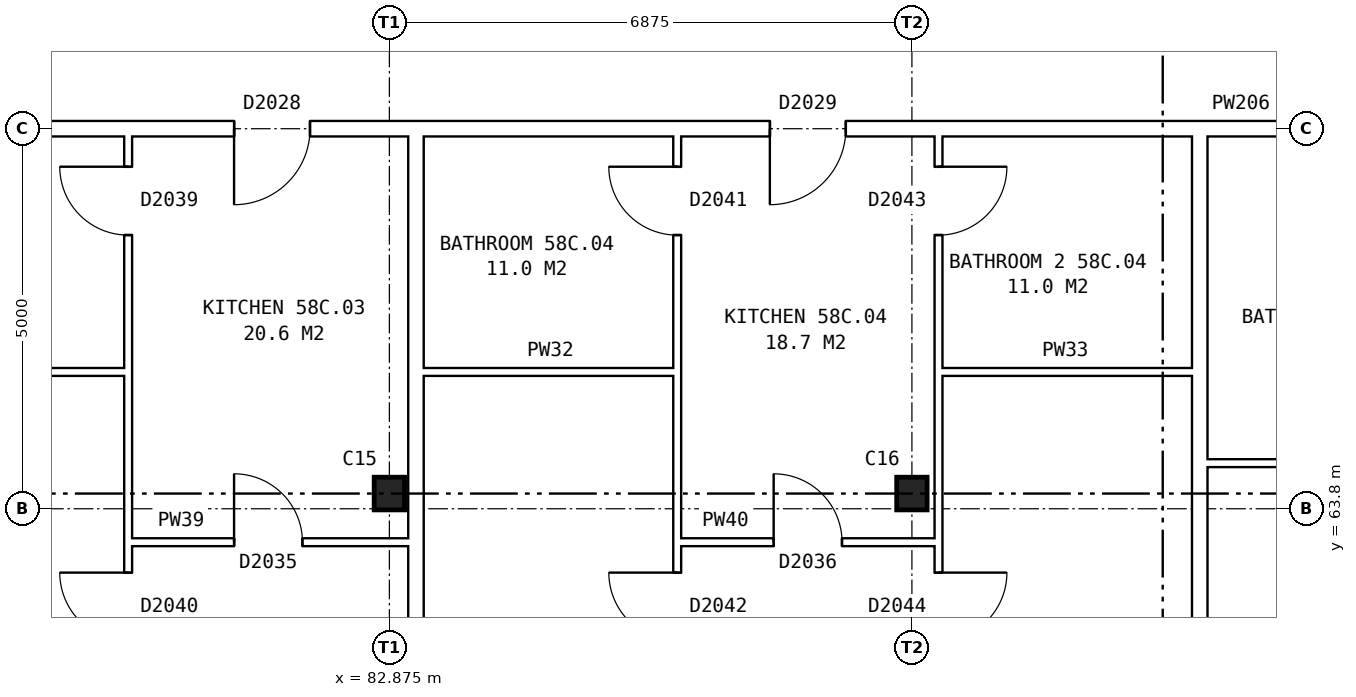
"""IFC4 building model, lengths in metres.
Left out: names, types, materials, properties, quantities, classifications, styles, units other than length and angle.
Written with IfcOpenShell. Run it as: python <this file> out.ifc"""

import sys

from ifc_helpers import new_model, si_unit, direction, frame, frame_2d, origin, origin_2d, place, context, subcontext, project, spatial, rectangle, i_section, extrude, element, fill, save


model = new_model("IFC4")
c1 = context("Model", 3, precision=1e-05, world=origin(), true_north=direction((0.0, 1.0)))
c2 = subcontext(c1, "Body", "Model", "MODEL_VIEW")
j1 = project(units=[si_unit("LENGTHUNIT", "METRE"), si_unit("PLANEANGLEUNIT", "RADIAN")], contexts=[c1])
p1 = place(None, origin())
s1 = spatial("IfcSite", under=j1, at=p1, CompositionType="ELEMENT")
p2 = place(p1, origin())
s2 = spatial("IfcBuilding", under=s1, at=p2, CompositionType="ELEMENT")
p3 = place(p2, frame((0.0, 0.0, 205.9)))
s3 = spatial("IfcBuildingStorey", under=s2, at=p3, CompositionType="ELEMENT", Elevation=205.9)
for number, where, z_axis, x_axis in (
    (1, (82.875, 64.0, 0.0), (0.0, 0.0, 1.0), (1.0, 0.0, 0.0)),
    (2, (89.75, 64.0, 0.0), (0.0, 0.0, 1.0), (1.0, 0.0, 0.0)),
):
    element("IfcColumn", number, at=place(p3, frame(where, z_axis=z_axis, x_axis=x_axis)), inside=s3, PredefinedType="COLUMN", context=c2, shape_type="SweptSolid", body=[
        extrude(i_section(OverallWidth=0.4, OverallDepth=0.43, WebThickness=0.04, FlangeThickness=0.04, at=origin_2d()), origin(), (0.0, 0.0, 1.0), 2.85),
    ])
p4 = place(p3, frame((79.438, 63.36, 0.0), z_axis=(0.0, 0.0, 1.0), x_axis=(1.0, 0.0, 0.0)))
e3 = element("IfcWall", 3, at=p4, inside=s3, PredefinedType="PARTITIONING", context=c2, shape_type="SweptSolid", body=[
    extrude(rectangle(XDim=3.687, YDim=0.1, at=frame_2d((1.844, 0.0))), origin(), (0.0, 0.0, 1.0), 2.85),
])
p5 = place(p4, frame((1.394, 0.0, 0.0)))
e4 = element("IfcOpeningElement", 4, at=p5, cuts=e3, PredefinedType="OPENING", context=c2, shape_type="SweptSolid", body=[
    extrude(rectangle(XDim=0.9, YDim=2.1, at=frame_2d((0.45, 1.05))), frame((0.0, 0.06, 0.0), z_axis=(0.0, -1.0, 0.0), x_axis=(1.0, 0.0, 0.0)), (0.0, 0.0, 1.0), 0.12),
])
p6 = place(p3, frame((86.662, 63.36, 0.0), z_axis=(0.0, 0.0, 1.0), x_axis=(1.0, 0.0, 0.0)))
e5 = element("IfcWall", 5, at=p6, inside=s3, PredefinedType="PARTITIONING", context=c2, shape_type="SweptSolid", body=[
    extrude(rectangle(XDim=3.438, YDim=0.1, at=frame_2d((1.719, 0.0))), origin(), (0.0, 0.0, 1.0), 2.85),
])
p7 = place(p6, frame((1.269, 0.0, 0.0)))
e6 = element("IfcOpeningElement", 6, at=p7, cuts=e5, PredefinedType="OPENING", context=c2, shape_type="SweptSolid", body=[
    extrude(rectangle(XDim=0.9, YDim=2.1, at=frame_2d((0.45, 1.05))), frame((0.0, 0.06, 0.0), z_axis=(0.0, -1.0, 0.0), x_axis=(1.0, 0.0, 0.0)), (0.0, 0.0, 1.0), 0.12),
])
p8 = place(p3, frame((93.637, 64.4, 0.0), z_axis=(0.0, 0.0, 1.0), x_axis=(1.0, 0.0, 0.0)))
e7 = element("IfcWall", 7, at=p8, inside=s3, PredefinedType="PARTITIONING", context=c2, shape_type="SweptSolid", body=[
    extrude(rectangle(XDim=3.338, YDim=0.1, at=frame_2d((1.669, 0.0))), origin(), (0.0, 0.0, 1.0), 2.85),
])
p9 = place(p3, frame((75.64, 65.6, 0.0), z_axis=(0.0, 0.0, 1.0), x_axis=(1.0, 0.0, 0.0)))
e8 = element("IfcWall", 8, at=p9, inside=s3, PredefinedType="PARTITIONING", context=c2, shape_type="SweptSolid", body=[
    extrude(rectangle(XDim=3.798, YDim=0.1, at=frame_2d((1.899, 0.0))), origin(), (0.0, 0.0, 1.0), 2.85),
])
p10 = place(p3, frame((83.325, 65.6, 0.0), z_axis=(0.0, 0.0, 1.0), x_axis=(1.0, 0.0, 0.0)))
e9 = element("IfcWall", 9, at=p10, inside=s3, PredefinedType="PARTITIONING", context=c2, shape_type="SweptSolid", body=[
    extrude(rectangle(XDim=3.337, YDim=0.1, at=frame_2d((1.668, 0.0))), origin(), (0.0, 0.0, 1.0), 2.85),
])
p11 = place(p3, frame((90.1, 65.6, 0.0), z_axis=(0.0, 0.0, 1.0), x_axis=(1.0, 0.0, 0.0)))
e10 = element("IfcWall", 10, at=p11, inside=s3, PredefinedType="PARTITIONING", context=c2, shape_type="SweptSolid", body=[
    extrude(rectangle(XDim=3.337, YDim=0.1, at=frame_2d((1.668, 0.0))), origin(), (0.0, 0.0, 1.0), 2.85),
])
p12 = place(p3, frame((75.64, 68.8, 0.0), z_axis=(0.0, 0.0, 1.0), x_axis=(1.0, 0.0, 0.0)))
e11 = element("IfcWall", 11, at=p12, inside=s3, PredefinedType="PARTITIONING", context=c2, shape_type="SweptSolid", body=[
    extrude(rectangle(XDim=55.72, YDim=0.2, at=frame_2d((27.86, 0.0))), origin(), (0.0, 0.0, 1.0), 2.85),
])
p13 = place(p12, frame((5.191, 0.0, 0.0)))
e12 = element("IfcOpeningElement", 12, at=p13, cuts=e11, PredefinedType="OPENING", context=c2, shape_type="SweptSolid", body=[
    extrude(rectangle(XDim=1.0, YDim=2.1, at=frame_2d((0.5, 1.05))), frame((0.0, 0.11, 0.0), z_axis=(0.0, -1.0, 0.0), x_axis=(1.0, 0.0, 0.0)), (0.0, 0.0, 1.0), 0.22),
])
p14 = place(p12, frame((12.241, 0.0, 0.0)))
e13 = element("IfcOpeningElement", 13, at=p14, cuts=e11, PredefinedType="OPENING", context=c2, shape_type="SweptSolid", body=[
    extrude(rectangle(XDim=1.0, YDim=2.1, at=frame_2d((0.5, 1.05))), frame((0.0, 0.11, 0.0), z_axis=(0.0, -1.0, 0.0), x_axis=(1.0, 0.0, 0.0)), (0.0, 0.0, 1.0), 0.22),
])
p15 = place(p12, frame((22.553, 0.0, 0.0)))
e14 = element("IfcOpeningElement", 14, at=p15, cuts=e11, PredefinedType="OPENING", context=c2, shape_type="SweptSolid", body=[
    extrude(rectangle(XDim=1.0, YDim=2.1, at=frame_2d((0.5, 1.05))), frame((0.0, 0.11, 0.0), z_axis=(0.0, -1.0, 0.0), x_axis=(1.0, 0.0, 0.0)), (0.0, 0.0, 1.0), 0.22),
])
p16 = place(p12, frame((32.866, 0.0, 0.0)))
e15 = element("IfcOpeningElement", 15, at=p16, cuts=e11, PredefinedType="OPENING", context=c2, shape_type="SweptSolid", body=[
    extrude(rectangle(XDim=1.0, YDim=2.1, at=frame_2d((0.5, 1.05))), frame((0.0, 0.11, 0.0), z_axis=(0.0, -1.0, 0.0), x_axis=(1.0, 0.0, 0.0)), (0.0, 0.0, 1.0), 0.22),
])
p17 = place(p12, frame((36.303, 0.0, 0.0)))
e16 = element("IfcOpeningElement", 16, at=p17, cuts=e11, PredefinedType="OPENING", context=c2, shape_type="SweptSolid", body=[
    extrude(rectangle(XDim=1.0, YDim=2.1, at=frame_2d((0.5, 1.05))), frame((0.0, 0.11, 0.0), z_axis=(0.0, -1.0, 0.0), x_axis=(1.0, 0.0, 0.0)), (0.0, 0.0, 1.0), 0.22),
])
p18 = place(p12, frame((43.178, 0.0, 0.0)))
e17 = element("IfcOpeningElement", 17, at=p18, cuts=e11, PredefinedType="OPENING", context=c2, shape_type="SweptSolid", body=[
    extrude(rectangle(XDim=1.0, YDim=2.1, at=frame_2d((0.5, 1.05))), frame((0.0, 0.11, 0.0), z_axis=(0.0, -1.0, 0.0), x_axis=(1.0, 0.0, 0.0)), (0.0, 0.0, 1.0), 0.22),
])
p19 = place(p12, frame((50.053, 0.0, 0.0)))
e18 = element("IfcOpeningElement", 18, at=p19, cuts=e11, PredefinedType="OPENING", context=c2, shape_type="SweptSolid", body=[
    extrude(rectangle(XDim=1.0, YDim=2.1, at=frame_2d((0.5, 1.05))), frame((0.0, 0.11, 0.0), z_axis=(0.0, -1.0, 0.0), x_axis=(1.0, 0.0, 0.0)), (0.0, 0.0, 1.0), 0.22),
])
p20 = place(p3, frame((79.438, 54.36, 0.0), z_axis=(0.0, 0.0, 1.0), x_axis=(0.0, 1.0, 0.0)))
e19 = element("IfcWall", 19, at=p20, inside=s3, PredefinedType="PARTITIONING", context=c2, shape_type="SweptSolid", body=[
    extrude(rectangle(XDim=14.34, YDim=0.1, at=frame_2d((7.17, 0.0))), origin(), (0.0, 0.0, 1.0), 2.85),
])
p21 = place(p20, frame((7.7, 0.0, 0.0)))
e20 = element("IfcOpeningElement", 20, at=p21, cuts=e19, PredefinedType="OPENING", context=c2, shape_type="SweptSolid", body=[
    extrude(rectangle(XDim=0.9, YDim=2.1, at=frame_2d((0.45, 1.05))), frame((0.0, 0.06, 0.0), z_axis=(0.0, -1.0, 0.0), x_axis=(1.0, 0.0, 0.0)), (0.0, 0.0, 1.0), 0.12),
])
p22 = place(p20, frame((13.04, 0.0, 0.0)))
e21 = element("IfcOpeningElement", 21, at=p22, cuts=e19, PredefinedType="OPENING", context=c2, shape_type="SweptSolid", body=[
    extrude(rectangle(XDim=0.9, YDim=2.1, at=frame_2d((0.45, 1.05))), frame((0.0, 0.06, 0.0), z_axis=(0.0, -1.0, 0.0), x_axis=(1.0, 0.0, 0.0)), (0.0, 0.0, 1.0), 0.12),
])
p23 = place(p3, frame((83.225, 54.36, 0.0), z_axis=(0.0, 0.0, 1.0), x_axis=(0.0, 1.0, 0.0)))
e22 = element("IfcWall", 22, at=p23, inside=s3, PredefinedType="PARTITIONING", context=c2, shape_type="SweptSolid", body=[
    extrude(rectangle(XDim=14.34, YDim=0.2, at=frame_2d((7.17, 0.0))), origin(), (0.0, 0.0, 1.0), 2.85),
])
p24 = place(p3, frame((86.662, 54.36, 0.0), z_axis=(0.0, 0.0, 1.0), x_axis=(0.0, 1.0, 0.0)))
e23 = element("IfcWall", 23, at=p24, inside=s3, PredefinedType="PARTITIONING", context=c2, shape_type="SweptSolid", body=[
    extrude(rectangle(XDim=14.34, YDim=0.1, at=frame_2d((7.17, 0.0))), origin(), (0.0, 0.0, 1.0), 2.85),
])
p25 = place(p24, frame((7.7, 0.0, 0.0)))
e24 = element("IfcOpeningElement", 24, at=p25, cuts=e23, PredefinedType="OPENING", context=c2, shape_type="SweptSolid", body=[
    extrude(rectangle(XDim=0.9, YDim=2.1, at=frame_2d((0.45, 1.05))), frame((0.0, 0.06, 0.0), z_axis=(0.0, -1.0, 0.0), x_axis=(1.0, 0.0, 0.0)), (0.0, 0.0, 1.0), 0.12),
])
p26 = place(p24, frame((13.04, 0.0, 0.0)))
e25 = element("IfcOpeningElement", 25, at=p26, cuts=e23, PredefinedType="OPENING", context=c2, shape_type="SweptSolid", body=[
    extrude(rectangle(XDim=0.9, YDim=2.1, at=frame_2d((0.45, 1.05))), frame((0.0, 0.06, 0.0), z_axis=(0.0, -1.0, 0.0), x_axis=(1.0, 0.0, 0.0)), (0.0, 0.0, 1.0), 0.12),
])
p27 = place(p3, frame((90.1, 54.36, 0.0), z_axis=(0.0, 0.0, 1.0), x_axis=(0.0, 1.0, 0.0)))
e26 = element("IfcWall", 26, at=p27, inside=s3, PredefinedType="PARTITIONING", context=c2, shape_type="SweptSolid", body=[
    extrude(rectangle(XDim=14.34, YDim=0.1, at=frame_2d((7.17, 0.0))), origin(), (0.0, 0.0, 1.0), 2.85),
])
p28 = place(p27, frame((7.7, 0.0, 0.0)))
e27 = element("IfcOpeningElement", 27, at=p28, cuts=e26, PredefinedType="OPENING", context=c2, shape_type="SweptSolid", body=[
    extrude(rectangle(XDim=0.9, YDim=2.1, at=frame_2d((0.45, 1.05))), frame((0.0, 0.06, 0.0), z_axis=(0.0, -1.0, 0.0), x_axis=(1.0, 0.0, 0.0)), (0.0, 0.0, 1.0), 0.12),
])
p29 = place(p27, frame((13.04, 0.0, 0.0)))
e28 = element("IfcOpeningElement", 28, at=p29, cuts=e26, PredefinedType="OPENING", context=c2, shape_type="SweptSolid", body=[
    extrude(rectangle(XDim=0.9, YDim=2.1, at=frame_2d((0.45, 1.05))), frame((0.0, 0.06, 0.0), z_axis=(0.0, -1.0, 0.0), x_axis=(1.0, 0.0, 0.0)), (0.0, 0.0, 1.0), 0.12),
])
p30 = place(p3, frame((93.537, 54.36, 0.0), z_axis=(0.0, 0.0, 1.0), x_axis=(0.0, 1.0, 0.0)))
e29 = element("IfcWall", 29, at=p30, inside=s3, PredefinedType="PARTITIONING", context=c2, shape_type="SweptSolid", body=[
    extrude(rectangle(XDim=14.34, YDim=0.2, at=frame_2d((7.17, 0.0))), origin(), (0.0, 0.0, 1.0), 2.85),
])
p31 = place(p21, origin())
e30 = element("IfcDoor", 30, at=p31, inside=s3, OperationType="SINGLE_SWING_RIGHT", PredefinedType="DOOR", context=c2, shape_type="SweptSolid", body=[
    extrude(rectangle(XDim=0.9, YDim=2.1, at=frame_2d((0.45, 1.05))), frame((0.0, 0.025, 0.0), z_axis=(0.0, -1.0, 0.0), x_axis=(1.0, 0.0, 0.0)), (0.0, 0.0, 1.0), 0.05),
])
fill(e20, e30)
p32 = place(p13, frame((1.0, 0.0, 0.0), z_axis=(0.0, 0.0, 1.0), x_axis=(-1.0, 0.0, 0.0)))
e31 = element("IfcDoor", 31, at=p32, inside=s3, OperationType="SINGLE_SWING_RIGHT", PredefinedType="DOOR", context=c2, shape_type="SweptSolid", body=[
    extrude(rectangle(XDim=1.0, YDim=2.1, at=frame_2d((0.5, 1.05))), frame((0.0, 0.025, 0.0), z_axis=(0.0, -1.0, 0.0), x_axis=(1.0, 0.0, 0.0)), (0.0, 0.0, 1.0), 0.05),
])
fill(e12, e31)
p33 = place(p5, origin())
e32 = element("IfcDoor", 32, at=p33, inside=s3, OperationType="SINGLE_SWING_LEFT", PredefinedType="DOOR", context=c2, shape_type="SweptSolid", body=[
    extrude(rectangle(XDim=0.9, YDim=2.1, at=frame_2d((0.45, 1.05))), frame((0.0, 0.025, 0.0), z_axis=(0.0, -1.0, 0.0), x_axis=(1.0, 0.0, 0.0)), (0.0, 0.0, 1.0), 0.05),
])
fill(e4, e32)
p34 = place(p22, origin())
e33 = element("IfcDoor", 33, at=p34, inside=s3, OperationType="SINGLE_SWING_RIGHT", PredefinedType="DOOR", context=c2, shape_type="SweptSolid", body=[
    extrude(rectangle(XDim=0.9, YDim=2.1, at=frame_2d((0.45, 1.05))), frame((0.0, 0.025, 0.0), z_axis=(0.0, -1.0, 0.0), x_axis=(1.0, 0.0, 0.0)), (0.0, 0.0, 1.0), 0.05),
])
fill(e21, e33)
p35 = place(p25, origin())
e34 = element("IfcDoor", 34, at=p35, inside=s3, OperationType="SINGLE_SWING_RIGHT", PredefinedType="DOOR", context=c2, shape_type="SweptSolid", body=[
    extrude(rectangle(XDim=0.9, YDim=2.1, at=frame_2d((0.45, 1.05))), frame((0.0, 0.025, 0.0), z_axis=(0.0, -1.0, 0.0), x_axis=(1.0, 0.0, 0.0)), (0.0, 0.0, 1.0), 0.05),
])
fill(e24, e34)
p36 = place(p28, frame((0.9, 0.0, 0.0), z_axis=(0.0, 0.0, 1.0), x_axis=(-1.0, 0.0, 0.0)))
e35 = element("IfcDoor", 35, at=p36, inside=s3, OperationType="SINGLE_SWING_LEFT", PredefinedType="DOOR", context=c2, shape_type="SweptSolid", body=[
    extrude(rectangle(XDim=0.9, YDim=2.1, at=frame_2d((0.45, 1.05))), frame((0.0, 0.025, 0.0), z_axis=(0.0, -1.0, 0.0), x_axis=(1.0, 0.0, 0.0)), (0.0, 0.0, 1.0), 0.05),
])
fill(e27, e35)
p37 = place(p14, frame((1.0, 0.0, 0.0), z_axis=(0.0, 0.0, 1.0), x_axis=(-1.0, 0.0, 0.0)))
e36 = element("IfcDoor", 36, at=p37, inside=s3, OperationType="SINGLE_SWING_RIGHT", PredefinedType="DOOR", context=c2, shape_type="SweptSolid", body=[
    extrude(rectangle(XDim=1.0, YDim=2.1, at=frame_2d((0.5, 1.05))), frame((0.0, 0.025, 0.0), z_axis=(0.0, -1.0, 0.0), x_axis=(1.0, 0.0, 0.0)), (0.0, 0.0, 1.0), 0.05),
])
fill(e13, e36)
p38 = place(p7, origin())
e37 = element("IfcDoor", 37, at=p38, inside=s3, OperationType="SINGLE_SWING_LEFT", PredefinedType="DOOR", context=c2, shape_type="SweptSolid", body=[
    extrude(rectangle(XDim=0.9, YDim=2.1, at=frame_2d((0.45, 1.05))), frame((0.0, 0.025, 0.0), z_axis=(0.0, -1.0, 0.0), x_axis=(1.0, 0.0, 0.0)), (0.0, 0.0, 1.0), 0.05),
])
fill(e6, e37)
p39 = place(p26, origin())
e38 = element("IfcDoor", 38, at=p39, inside=s3, OperationType="SINGLE_SWING_RIGHT", PredefinedType="DOOR", context=c2, shape_type="SweptSolid", body=[
    extrude(rectangle(XDim=0.9, YDim=2.1, at=frame_2d((0.45, 1.05))), frame((0.0, 0.025, 0.0), z_axis=(0.0, -1.0, 0.0), x_axis=(1.0, 0.0, 0.0)), (0.0, 0.0, 1.0), 0.05),
])
fill(e25, e38)
p40 = place(p29, frame((0.9, 0.0, 0.0), z_axis=(0.0, 0.0, 1.0), x_axis=(-1.0, 0.0, 0.0)))
e39 = element("IfcDoor", 39, at=p40, inside=s3, OperationType="SINGLE_SWING_LEFT", PredefinedType="DOOR", context=c2, shape_type="SweptSolid", body=[
    extrude(rectangle(XDim=0.9, YDim=2.1, at=frame_2d((0.45, 1.05))), frame((0.0, 0.025, 0.0), z_axis=(0.0, -1.0, 0.0), x_axis=(1.0, 0.0, 0.0)), (0.0, 0.0, 1.0), 0.05),
])
fill(e28, e39)
save(model, sys.argv[1])
